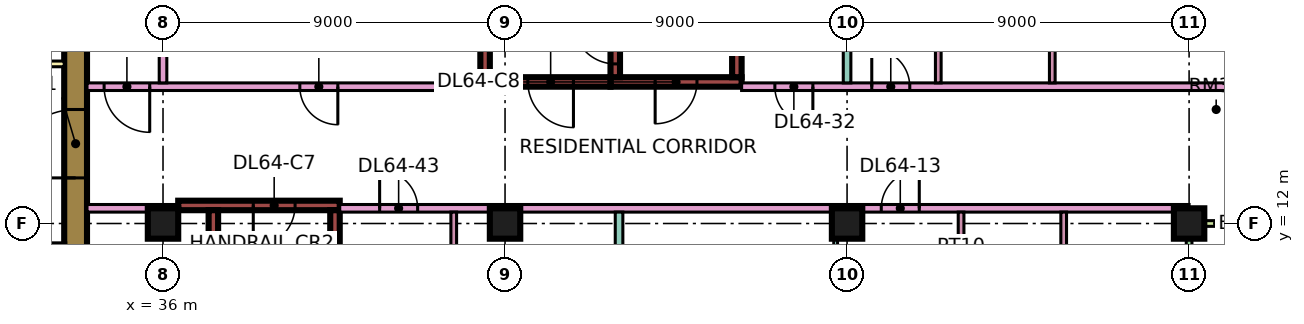
"""IFC4 building model, lengths in metres.
Left out: names, types, materials, properties, quantities, classifications, styles, units other than length and angle.
Written with IfcOpenShell. Run it as: python <this file> out.ifc"""

import sys

from ifc_helpers import new_model, si_unit, direction, frame, frame_2d, origin, origin_2d, place, context, subcontext, project, spatial, rectangle, extrude, element, fill, save


model = new_model("IFC4")
c1 = context("Model", 3, precision=1e-05, world=origin(), true_north=direction((0.0, 1.0)))
c2 = subcontext(c1, "Body", "Model", "MODEL_VIEW")
j1 = project(units=[si_unit("LENGTHUNIT", "METRE"), si_unit("PLANEANGLEUNIT", "RADIAN")], contexts=[c1])
p1 = place(None, origin())
s1 = spatial("IfcSite", under=j1, at=p1, CompositionType="ELEMENT")
p2 = place(p1, origin())
s2 = spatial("IfcBuilding", under=s1, at=p2, CompositionType="ELEMENT")
p3 = place(p2, frame((0.0, 0.0, 277.15)))
s3 = spatial("IfcBuildingStorey", under=s2, at=p3, CompositionType="ELEMENT", Elevation=277.15)
for number, where, z_axis, x_axis in (
    (1, (36.0, 12.0, 0.0), (0.0, 0.0, 1.0), (1.0, 0.0, 0.0)),
    (2, (45.0, 12.0, 0.0), (0.0, 0.0, 1.0), (1.0, 0.0, 0.0)),
    (3, (54.0, 12.0, 0.0), (0.0, 0.0, 1.0), (1.0, 0.0, 0.0)),
    (4, (63.0, 12.0, 0.0), (0.0, 0.0, 1.0), (1.0, 0.0, 0.0)),
):
    element("IfcColumn", number, at=place(p3, frame(where, z_axis=z_axis, x_axis=x_axis)), inside=s3, PredefinedType="COLUMN", context=c2, shape_type="SweptSolid", body=[
        extrude(rectangle(XDim=0.8, YDim=0.8, at=origin_2d()), origin(), (0.0, 0.0, 1.0), 3.75),
    ])
p4 = place(p3, frame((33.7, 7.6, 0.0), z_axis=(0.0, 0.0, 1.0), x_axis=(0.0, 1.0, 0.0)))
e5 = element("IfcWall", 5, at=p4, inside=s3, PredefinedType="SHEAR", context=c2, shape_type="SweptSolid", body=[
    extrude(rectangle(XDim=11.8, YDim=0.6, at=frame_2d((5.9, 0.0))), origin(), (0.0, 0.0, 1.0), 3.75),
])
p5 = place(p4, frame((5.6, 0.0, 0.0)))
e6 = element("IfcOpeningElement", 6, at=p5, cuts=e5, PredefinedType="OPENING", context=c2, shape_type="SweptSolid", body=[
    extrude(rectangle(XDim=1.8, YDim=2.4, at=frame_2d((0.9, 1.2))), frame((0.0, 0.31, 0.0), z_axis=(0.0, -1.0, 0.0), x_axis=(1.0, 0.0, 0.0)), (0.0, 0.0, 1.0), 0.62),
])
p6 = place(p3, frame((36.4, 12.475, 0.0), z_axis=(0.0, 0.0, 1.0), x_axis=(1.0, 0.0, 0.0)))
e7 = element("IfcWall", 7, at=p6, inside=s3, PredefinedType="SHEAR", context=c2, shape_type="SweptSolid", body=[
    extrude(rectangle(XDim=4.25, YDim=0.25, at=frame_2d((2.125, 0.0))), origin(), (0.0, 0.0, 1.0), 3.75),
])
p7 = place(p6, frame((1.975, 0.0, 0.0)))
e8 = element("IfcOpeningElement", 8, at=p7, cuts=e7, PredefinedType="OPENING", context=c2, shape_type="SweptSolid", body=[
    extrude(rectangle(XDim=1.1, YDim=2.2, at=frame_2d((0.55, 1.1))), frame((0.0, 0.135, 0.0), z_axis=(0.0, -1.0, 0.0), x_axis=(1.0, 0.0, 0.0)), (0.0, 0.0, 1.0), 0.27),
])
for number, where, z_axis, x_axis in (
    (9, (37.325, 5.85, 0.0), (0.0, 0.0, 1.0), (0.0, 1.0, 0.0)),
    (10, (40.525, 5.85, 0.0), (0.0, 0.0, 1.0), (0.0, 1.0, 0.0)),
):
    element("IfcWall", number, at=place(p3, frame(where, z_axis=z_axis, x_axis=x_axis)), inside=s3, PredefinedType="SHEAR", context=c2, shape_type="SweptSolid", body=[
        extrude(rectangle(XDim=6.5, YDim=0.25, at=frame_2d((3.25, 0.0))), origin(), (0.0, 0.0, 1.0), 3.75),
    ])
p8 = place(p3, frame((47.775, 15.725, 0.0), z_axis=(0.0, 0.0, 1.0), x_axis=(1.0, 0.0, 0.0)))
e11 = element("IfcWall", 11, at=p8, inside=s3, PredefinedType="SHEAR", context=c2, shape_type="SweptSolid", body=[
    extrude(rectangle(XDim=3.45, YDim=0.25, at=frame_2d((1.725, 0.0))), origin(), (0.0, 0.0, 1.0), 3.75),
])
p9 = place(p8, frame((1.175, 0.0, 0.0)))
e12 = element("IfcOpeningElement", 12, at=p9, cuts=e11, PredefinedType="OPENING", context=c2, shape_type="SweptSolid", body=[
    extrude(rectangle(XDim=1.1, YDim=2.2, at=frame_2d((0.55, 1.1))), frame((0.0, 0.135, 0.0), z_axis=(0.0, -1.0, 0.0), x_axis=(1.0, 0.0, 0.0)), (0.0, 0.0, 1.0), 0.27),
])
p10 = place(p3, frame((47.9, 15.85, 0.0), z_axis=(0.0, 0.0, 1.0), x_axis=(0.0, 1.0, 0.0)))
e13 = element("IfcWall", 13, at=p10, inside=s3, PredefinedType="SHEAR", context=c2, shape_type="SweptSolid", body=[
    extrude(rectangle(XDim=6.5, YDim=0.25, at=frame_2d((3.25, 0.0))), origin(), (0.0, 0.0, 1.0), 3.75),
])
p11 = place(p10, frame((0.35, 0.0, 0.0)))
e14 = element("IfcOpeningElement", 14, at=p11, cuts=e13, PredefinedType="OPENING", context=c2, shape_type="SweptSolid", body=[
    extrude(rectangle(XDim=1.1, YDim=2.2, at=frame_2d((0.55, 1.1))), frame((0.0, 0.135, 0.0), z_axis=(0.0, -1.0, 0.0), x_axis=(1.0, 0.0, 0.0)), (0.0, 0.0, 1.0), 0.27),
])
p12 = place(p3, frame((51.1, 15.85, 0.0), z_axis=(0.0, 0.0, 1.0), x_axis=(0.0, 1.0, 0.0)))
e15 = element("IfcWall", 15, at=p12, inside=s3, PredefinedType="SHEAR", context=c2, shape_type="SweptSolid", body=[
    extrude(rectangle(XDim=6.5, YDim=0.25, at=frame_2d((3.25, 0.0))), origin(), (0.0, 0.0, 1.0), 3.75),
])
p13 = place(p3, frame((44.35, 15.725, 0.0), z_axis=(0.0, 0.0, 1.0), x_axis=(1.0, 0.0, 0.0)))
e16 = element("IfcWall", 16, at=p13, inside=s3, PredefinedType="SHEAR", context=c2, shape_type="SweptSolid", body=[
    extrude(rectangle(XDim=3.425, YDim=0.25, at=frame_2d((1.712, 0.0))), origin(), (0.0, 0.0, 1.0), 3.75),
])
p14 = place(p13, frame((1.25, 0.0, 0.0)))
e17 = element("IfcOpeningElement", 17, at=p14, cuts=e16, PredefinedType="OPENING", context=c2, shape_type="SweptSolid", body=[
    extrude(rectangle(XDim=1.2, YDim=2.2, at=frame_2d((0.6, 1.1))), frame((0.0, 0.135, 0.0), z_axis=(0.0, -1.0, 0.0), x_axis=(1.0, 0.0, 0.0)), (0.0, 0.0, 1.0), 0.27),
])
p15 = place(p3, frame((44.475, 15.85, 0.0), z_axis=(0.0, 0.0, 1.0), x_axis=(0.0, 1.0, 0.0)))
e18 = element("IfcWall", 18, at=p15, inside=s3, PredefinedType="SHEAR", context=c2, shape_type="SweptSolid", body=[
    extrude(rectangle(XDim=6.5, YDim=0.25, at=frame_2d((3.25, 0.0))), origin(), (0.0, 0.0, 1.0), 3.75),
])
p16 = place(p15, frame((1.75, 0.0, 0.0)))
e19 = element("IfcOpeningElement", 19, at=p16, cuts=e18, PredefinedType="OPENING", context=c2, shape_type="SweptSolid", body=[
    extrude(rectangle(XDim=1.1, YDim=2.2, at=frame_2d((0.55, 1.1))), frame((0.0, 0.135, 0.0), z_axis=(0.0, -1.0, 0.0), x_axis=(1.0, 0.0, 0.0)), (0.0, 0.0, 1.0), 0.27),
])
p17 = place(p15, frame((4.3, 0.0, 0.0)))
e20 = element("IfcOpeningElement", 20, at=p17, cuts=e18, PredefinedType="OPENING", context=c2, shape_type="SweptSolid", body=[
    extrude(rectangle(XDim=1.1, YDim=2.2, at=frame_2d((0.55, 1.1))), frame((0.0, 0.135, 0.0), z_axis=(0.0, -1.0, 0.0), x_axis=(1.0, 0.0, 0.0)), (0.0, 0.0, 1.0), 0.27),
])
p18 = place(p3, frame((63.0, 1.575, 0.0), z_axis=(0.0, 0.0, 1.0), x_axis=(0.0, 1.0, 0.0)))
e21 = element("IfcWall", 21, at=p18, inside=s3, PredefinedType="SOLIDWALL", context=c2, shape_type="SweptSolid", body=[
    extrude(rectangle(XDim=10.35, YDim=0.15, at=frame_2d((5.175, 0.0))), origin(), (0.0, 0.0, 1.0), 3.35),
])
p19 = place(p18, frame((1.812, 0.0, 0.0)))
e22 = element("IfcOpeningElement", 22, at=p19, cuts=e21, PredefinedType="OPENING", context=c2, shape_type="SweptSolid", body=[
    extrude(rectangle(XDim=1.8, YDim=2.4, at=frame_2d((0.9, 1.2))), frame((0.0, 0.085, 0.0), z_axis=(0.0, -1.0, 0.0), x_axis=(1.0, 0.0, 0.0)), (0.0, 0.0, 1.0), 0.17),
])
p20 = place(p18, frame((7.675, 0.0, 1.7)))
e23 = element("IfcOpeningElement", 23, at=p20, cuts=e21, PredefinedType="OPENING", context=c2, shape_type="SweptSolid", body=[
    extrude(rectangle(XDim=1.2, YDim=0.9, at=frame_2d((0.6, 0.45))), frame((0.0, 0.085, 0.0), z_axis=(0.0, -1.0, 0.0), x_axis=(1.0, 0.0, 0.0)), (0.0, 0.0, 1.0), 0.17),
])
p21 = place(p3, frame((64.5, 12.0, 0.0), z_axis=(0.0, 0.0, 1.0), x_axis=(-1.0, 0.0, 0.0)))
e24 = element("IfcWall", 24, at=p21, inside=s3, PredefinedType="SOLIDWALL", context=c2, shape_type="SweptSolid", body=[
    extrude(rectangle(XDim=1.5, YDim=0.15, at=frame_2d((0.75, 0.0))), origin(), (0.0, 0.0, 1.0), 3.35),
])
p22 = place(p3, frame((31.4, 16.2, 0.0), z_axis=(0.0, 0.0, 1.0), x_axis=(1.0, 0.0, 0.0)))
e25 = element("IfcWall", 25, at=p22, inside=s3, PredefinedType="PARTITIONING", context=c2, shape_type="SweptSolid", body=[
    extrude(rectangle(XDim=2.0, YDim=0.15, at=frame_2d((1.0, 0.0))), origin(), (0.0, 0.0, 1.0), 3.35),
])
p23 = place(p3, frame((34.0, 12.4, 0.0), z_axis=(0.0, 0.0, 1.0), x_axis=(1.0, 0.0, 0.0)))
e26 = element("IfcWall", 26, at=p23, inside=s3, PredefinedType="PARTITIONING", context=c2, shape_type="SweptSolid", body=[
    extrude(rectangle(XDim=2.401, YDim=0.2, at=frame_2d((1.2, 0.0))), origin(), (0.0, 0.0, 1.0), 3.35),
])
p24 = place(p3, frame((34.0, 15.6, 0.0), z_axis=(0.0, 0.0, 1.0), x_axis=(1.0, 0.0, 0.0)))
e27 = element("IfcWall", 27, at=p24, inside=s3, PredefinedType="PARTITIONING", context=c2, shape_type="SweptSolid", body=[
    extrude(rectangle(XDim=10.35, YDim=0.2, at=frame_2d((5.175, 0.0))), origin(), (0.0, 0.0, 1.0), 3.35),
])
p25 = place(p24, frame((5.6, 0.0, 0.0)))
e28 = element("IfcOpeningElement", 28, at=p25, cuts=e27, PredefinedType="OPENING", context=c2, shape_type="SweptSolid", body=[
    extrude(rectangle(XDim=1.0, YDim=2.1, at=frame_2d((0.5, 1.05))), frame((0.0, 0.11, 0.0), z_axis=(0.0, -1.0, 0.0), x_axis=(1.0, 0.0, 0.0)), (0.0, 0.0, 1.0), 0.22),
])
p26 = place(p24, frame((0.45, 0.0, 0.0)))
e29 = element("IfcOpeningElement", 29, at=p26, cuts=e27, PredefinedType="OPENING", context=c2, shape_type="SweptSolid", body=[
    extrude(rectangle(XDim=1.2, YDim=2.1, at=frame_2d((0.6, 1.05))), frame((0.0, 0.11, 0.0), z_axis=(0.0, -1.0, 0.0), x_axis=(1.0, 0.0, 0.0)), (0.0, 0.0, 1.0), 0.22),
])
p27 = place(p3, frame((36.0, 15.7, 0.0), z_axis=(0.0, 0.0, 1.0), x_axis=(0.0, 1.0, 0.0)))
e30 = element("IfcWall", 30, at=p27, inside=s3, PredefinedType="PARTITIONING", context=c2, shape_type="SweptSolid", body=[
    extrude(rectangle(XDim=8.3, YDim=0.2, at=frame_2d((4.15, 0.0))), origin(), (0.0, 0.0, 1.0), 3.35),
])
p28 = place(p3, frame((40.65, 12.4, 0.0), z_axis=(0.0, 0.0, 1.0), x_axis=(1.0, 0.0, 0.0)))
e31 = element("IfcWall", 31, at=p28, inside=s3, PredefinedType="PARTITIONING", context=c2, shape_type="SweptSolid", body=[
    extrude(rectangle(XDim=22.35, YDim=0.2, at=frame_2d((11.175, 0.0))), origin(), (0.0, 0.0, 1.0), 3.35),
])
p29 = place(p28, frame((14.25, 0.0, 0.0)))
e32 = element("IfcOpeningElement", 32, at=p29, cuts=e31, PredefinedType="OPENING", context=c2, shape_type="SweptSolid", body=[
    extrude(rectangle(XDim=1.0, YDim=2.1, at=frame_2d((0.5, 1.05))), frame((0.0, 0.11, 0.0), z_axis=(0.0, -1.0, 0.0), x_axis=(1.0, 0.0, 0.0)), (0.0, 0.0, 1.0), 0.22),
])
p30 = place(p28, frame((1.05, 0.0, 0.0)))
e33 = element("IfcOpeningElement", 33, at=p30, cuts=e31, PredefinedType="OPENING", context=c2, shape_type="SweptSolid", body=[
    extrude(rectangle(XDim=1.0, YDim=2.1, at=frame_2d((0.5, 1.05))), frame((0.0, 0.11, 0.0), z_axis=(0.0, -1.0, 0.0), x_axis=(1.0, 0.0, 0.0)), (0.0, 0.0, 1.0), 0.22),
])
p31 = place(p3, frame((43.65, 5.825, 0.0), z_axis=(0.0, 0.0, 1.0), x_axis=(0.0, 1.0, 0.0)))
e34 = element("IfcWall", 34, at=p31, inside=s3, PredefinedType="PARTITIONING", context=c2, shape_type="SweptSolid", body=[
    extrude(rectangle(XDim=6.475, YDim=0.15, at=frame_2d((3.238, 0.0))), origin(), (0.0, 0.0, 1.0), 3.35),
])
p32 = place(p31, frame((4.425, 0.0, 0.0)))
e35 = element("IfcOpeningElement", 35, at=p32, cuts=e34, PredefinedType="OPENING", context=c2, shape_type="SweptSolid", body=[
    extrude(rectangle(XDim=0.9, YDim=2.1, at=frame_2d((0.45, 1.05))), frame((0.0, 0.085, 0.0), z_axis=(0.0, -1.0, 0.0), x_axis=(1.0, 0.0, 0.0)), (0.0, 0.0, 1.0), 0.17),
])
p33 = place(p3, frame((48.0, 0.0, 0.0), z_axis=(0.0, 0.0, 1.0), x_axis=(0.0, 1.0, 0.0)))
e36 = element("IfcWall", 36, at=p33, inside=s3, PredefinedType="PARTITIONING", context=c2, shape_type="SweptSolid", body=[
    extrude(rectangle(XDim=12.3, YDim=0.2, at=frame_2d((6.15, 0.0))), origin(), (0.0, 0.0, 1.0), 3.35),
])
p34 = place(p3, frame((51.225, 15.6, 0.0), z_axis=(0.0, 0.0, 1.0), x_axis=(1.0, 0.0, 0.0)))
e37 = element("IfcWall", 37, at=p34, inside=s3, PredefinedType="PARTITIONING", context=c2, shape_type="SweptSolid", body=[
    extrude(rectangle(XDim=13.125, YDim=0.2, at=frame_2d((6.562, 0.0))), origin(), (0.0, 0.0, 1.0), 3.35),
])
p35 = place(p34, frame((3.425, 0.0, 0.0)))
e38 = element("IfcOpeningElement", 38, at=p35, cuts=e37, PredefinedType="OPENING", context=c2, shape_type="SweptSolid", body=[
    extrude(rectangle(XDim=1.0, YDim=2.1, at=frame_2d((0.5, 1.05))), frame((0.0, 0.11, 0.0), z_axis=(0.0, -1.0, 0.0), x_axis=(1.0, 0.0, 0.0)), (0.0, 0.0, 1.0), 0.22),
])
p36 = place(p34, frame((0.875, 0.0, 0.0)))
e39 = element("IfcOpeningElement", 39, at=p36, cuts=e37, PredefinedType="OPENING", context=c2, shape_type="SweptSolid", body=[
    extrude(rectangle(XDim=1.0, YDim=2.1, at=frame_2d((0.5, 1.05))), frame((0.0, 0.11, 0.0), z_axis=(0.0, -1.0, 0.0), x_axis=(1.0, 0.0, 0.0)), (0.0, 0.0, 1.0), 0.22),
])
p37 = place(p3, frame((53.7, 8.25, 0.0), z_axis=(0.0, 0.0, 1.0), x_axis=(0.0, 1.0, 0.0)))
e40 = element("IfcWall", 40, at=p37, inside=s3, PredefinedType="PARTITIONING", context=c2, shape_type="SweptSolid", body=[
    extrude(rectangle(XDim=4.05, YDim=0.1, at=frame_2d((2.025, 0.0))), origin(), (0.0, 0.0, 1.0), 3.35),
])
p38 = place(p37, frame((1.6, 0.0, 0.0)))
e41 = element("IfcOpeningElement", 41, at=p38, cuts=e40, PredefinedType="OPENING", context=c2, shape_type="SweptSolid", body=[
    extrude(rectangle(XDim=0.9, YDim=2.1, at=frame_2d((0.45, 1.05))), frame((0.0, 0.06, 0.0), z_axis=(0.0, -1.0, 0.0), x_axis=(1.0, 0.0, 0.0)), (0.0, 0.0, 1.0), 0.12),
])
p39 = place(p3, frame((54.0, 15.7, 0.0), z_axis=(0.0, 0.0, 1.0), x_axis=(0.0, 1.0, 0.0)))
e42 = element("IfcWall", 42, at=p39, inside=s3, PredefinedType="PARTITIONING", context=c2, shape_type="SweptSolid", body=[
    extrude(rectangle(XDim=8.226, YDim=0.2, at=frame_2d((4.113, 0.0))), origin(), (0.0, 0.0, 1.0), 3.35),
])
p40 = place(p3, frame((56.4, 15.7, 0.0), z_axis=(0.0, 0.0, 1.0), x_axis=(0.0, 1.0, 0.0)))
e43 = element("IfcWall", 43, at=p40, inside=s3, PredefinedType="PARTITIONING", context=c2, shape_type="SweptSolid", body=[
    extrude(rectangle(XDim=2.825, YDim=0.15, at=frame_2d((1.413, 0.0))), origin(), (0.0, 0.0, 1.0), 3.35),
])
p41 = place(p3, frame((57.0, 8.275, 0.0), z_axis=(0.0, 0.0, 1.0), x_axis=(0.0, 1.0, 0.0)))
e44 = element("IfcWall", 44, at=p41, inside=s3, PredefinedType="PARTITIONING", context=c2, shape_type="SweptSolid", body=[
    extrude(rectangle(XDim=4.025, YDim=0.15, at=frame_2d((2.013, 0.0))), origin(), (0.0, 0.0, 1.0), 3.35),
])
p42 = place(p41, frame((1.575, 0.0, 0.0)))
e45 = element("IfcOpeningElement", 45, at=p42, cuts=e44, PredefinedType="OPENING", context=c2, shape_type="SweptSolid", body=[
    extrude(rectangle(XDim=0.8, YDim=2.1, at=frame_2d((0.4, 1.05))), frame((0.0, 0.085, 0.0), z_axis=(0.0, -1.0, 0.0), x_axis=(1.0, 0.0, 0.0)), (0.0, 0.0, 1.0), 0.17),
])
p43 = place(p3, frame((59.4, 15.7, 0.0), z_axis=(0.0, 0.0, 1.0), x_axis=(0.0, 1.0, 0.0)))
e46 = element("IfcWall", 46, at=p43, inside=s3, PredefinedType="PARTITIONING", context=c2, shape_type="SweptSolid", body=[
    extrude(rectangle(XDim=2.825, YDim=0.15, at=frame_2d((1.413, 0.0))), origin(), (0.0, 0.0, 1.0), 3.35),
])
p44 = place(p3, frame((59.7, 8.275, 0.0), z_axis=(0.0, 0.0, 1.0), x_axis=(0.0, 1.0, 0.0)))
e47 = element("IfcWall", 47, at=p44, inside=s3, PredefinedType="PARTITIONING", context=c2, shape_type="SweptSolid", body=[
    extrude(rectangle(XDim=4.025, YDim=0.15, at=frame_2d((2.013, 0.0))), origin(), (0.0, 0.0, 1.0), 3.35),
])
p45 = place(p5, origin())
e48 = element("IfcDoor", 48, at=p45, inside=s3, OperationType="DOUBLE_DOOR_SINGLE_SWING", PredefinedType="DOOR", context=c2, shape_type="SweptSolid", body=[
    extrude(rectangle(XDim=1.8, YDim=2.4, at=frame_2d((0.9, 1.2))), frame((0.0, 0.025, 0.0), z_axis=(0.0, -1.0, 0.0), x_axis=(1.0, 0.0, 0.0)), (0.0, 0.0, 1.0), 0.05),
])
fill(e6, e48)
p46 = place(p7, frame((1.1, 0.0, 0.0), z_axis=(0.0, 0.0, 1.0), x_axis=(-1.0, 0.0, 0.0)))
e49 = element("IfcDoor", 49, at=p46, inside=s3, OperationType="SINGLE_SWING_LEFT", PredefinedType="DOOR", context=c2, shape_type="SweptSolid", body=[
    extrude(rectangle(XDim=1.1, YDim=2.2, at=frame_2d((0.55, 1.1))), frame((0.0, 0.025, 0.0), z_axis=(0.0, -1.0, 0.0), x_axis=(1.0, 0.0, 0.0)), (0.0, 0.0, 1.0), 0.05),
])
fill(e8, e49)
p47 = place(p9, frame((1.1, 0.0, 0.0), z_axis=(0.0, 0.0, 1.0), x_axis=(-1.0, 0.0, 0.0)))
e50 = element("IfcDoor", 50, at=p47, inside=s3, OperationType="SINGLE_SWING_LEFT", PredefinedType="DOOR", context=c2, shape_type="SweptSolid", body=[
    extrude(rectangle(XDim=1.1, YDim=2.2, at=frame_2d((0.55, 1.1))), frame((0.0, 0.025, 0.0), z_axis=(0.0, -1.0, 0.0), x_axis=(1.0, 0.0, 0.0)), (0.0, 0.0, 1.0), 0.05),
])
fill(e12, e50)
p48 = place(p14, origin())
e51 = element("IfcDoor", 51, at=p48, inside=s3, OperationType="SINGLE_SWING_RIGHT", PredefinedType="DOOR", context=c2, shape_type="SweptSolid", body=[
    extrude(rectangle(XDim=1.2, YDim=2.2, at=frame_2d((0.6, 1.1))), frame((0.0, 0.025, 0.0), z_axis=(0.0, -1.0, 0.0), x_axis=(1.0, 0.0, 0.0)), (0.0, 0.0, 1.0), 0.05),
])
fill(e17, e51)
p49 = place(p11, frame((1.1, 0.0, 0.0), z_axis=(0.0, 0.0, 1.0), x_axis=(-1.0, 0.0, 0.0)))
e52 = element("IfcDoor", 52, at=p49, inside=s3, OperationType="SINGLE_SWING_RIGHT", PredefinedType="DOOR", context=c2, shape_type="SweptSolid", body=[
    extrude(rectangle(XDim=1.1, YDim=2.2, at=frame_2d((0.55, 1.1))), frame((0.0, 0.025, 0.0), z_axis=(0.0, -1.0, 0.0), x_axis=(1.0, 0.0, 0.0)), (0.0, 0.0, 1.0), 0.05),
])
fill(e14, e52)
p50 = place(p25, origin())
e53 = element("IfcDoor", 53, at=p50, inside=s3, OperationType="SINGLE_SWING_RIGHT", PredefinedType="DOOR", context=c2, shape_type="SweptSolid", body=[
    extrude(rectangle(XDim=1.0, YDim=2.1, at=frame_2d((0.5, 1.05))), frame((0.0, 0.025, 0.0), z_axis=(0.0, -1.0, 0.0), x_axis=(1.0, 0.0, 0.0)), (0.0, 0.0, 1.0), 0.05),
])
fill(e28, e53)
p51 = place(p35, origin())
e54 = element("IfcDoor", 54, at=p51, inside=s3, OperationType="SINGLE_SWING_LEFT", PredefinedType="DOOR", context=c2, shape_type="SweptSolid", body=[
    extrude(rectangle(XDim=1.0, YDim=2.1, at=frame_2d((0.5, 1.05))), frame((0.0, 0.025, 0.0), z_axis=(0.0, -1.0, 0.0), x_axis=(1.0, 0.0, 0.0)), (0.0, 0.0, 1.0), 0.05),
])
fill(e38, e54)
p52 = place(p29, frame((1.0, 0.0, 0.0), z_axis=(0.0, 0.0, 1.0), x_axis=(-1.0, 0.0, 0.0)))
e55 = element("IfcDoor", 55, at=p52, inside=s3, OperationType="SINGLE_SWING_RIGHT", PredefinedType="DOOR", context=c2, shape_type="SweptSolid", body=[
    extrude(rectangle(XDim=1.0, YDim=2.1, at=frame_2d((0.5, 1.05))), frame((0.0, 0.025, 0.0), z_axis=(0.0, -1.0, 0.0), x_axis=(1.0, 0.0, 0.0)), (0.0, 0.0, 1.0), 0.05),
])
fill(e32, e55)
p53 = place(p26, origin())
e56 = element("IfcDoor", 56, at=p53, inside=s3, OperationType="SINGLE_SWING_RIGHT", PredefinedType="DOOR", context=c2, shape_type="SweptSolid", body=[
    extrude(rectangle(XDim=1.2, YDim=2.1, at=frame_2d((0.6, 1.05))), frame((0.0, 0.025, 0.0), z_axis=(0.0, -1.0, 0.0), x_axis=(1.0, 0.0, 0.0)), (0.0, 0.0, 1.0), 0.05),
])
fill(e29, e56)
p54 = place(p36, origin())
e57 = element("IfcDoor", 57, at=p54, inside=s3, OperationType="SINGLE_SWING_RIGHT", PredefinedType="DOOR", context=c2, shape_type="SweptSolid", body=[
    extrude(rectangle(XDim=1.0, YDim=2.1, at=frame_2d((0.5, 1.05))), frame((0.0, 0.025, 0.0), z_axis=(0.0, -1.0, 0.0), x_axis=(1.0, 0.0, 0.0)), (0.0, 0.0, 1.0), 0.05),
])
fill(e39, e57)
p55 = place(p30, origin())
e58 = element("IfcDoor", 58, at=p55, inside=s3, OperationType="SINGLE_SWING_LEFT", PredefinedType="DOOR", context=c2, shape_type="SweptSolid", body=[
    extrude(rectangle(XDim=1.0, YDim=2.1, at=frame_2d((0.5, 1.05))), frame((0.0, 0.025, 0.0), z_axis=(0.0, -1.0, 0.0), x_axis=(1.0, 0.0, 0.0)), (0.0, 0.0, 1.0), 0.05),
])
fill(e33, e58)
save(model, sys.argv[1])
